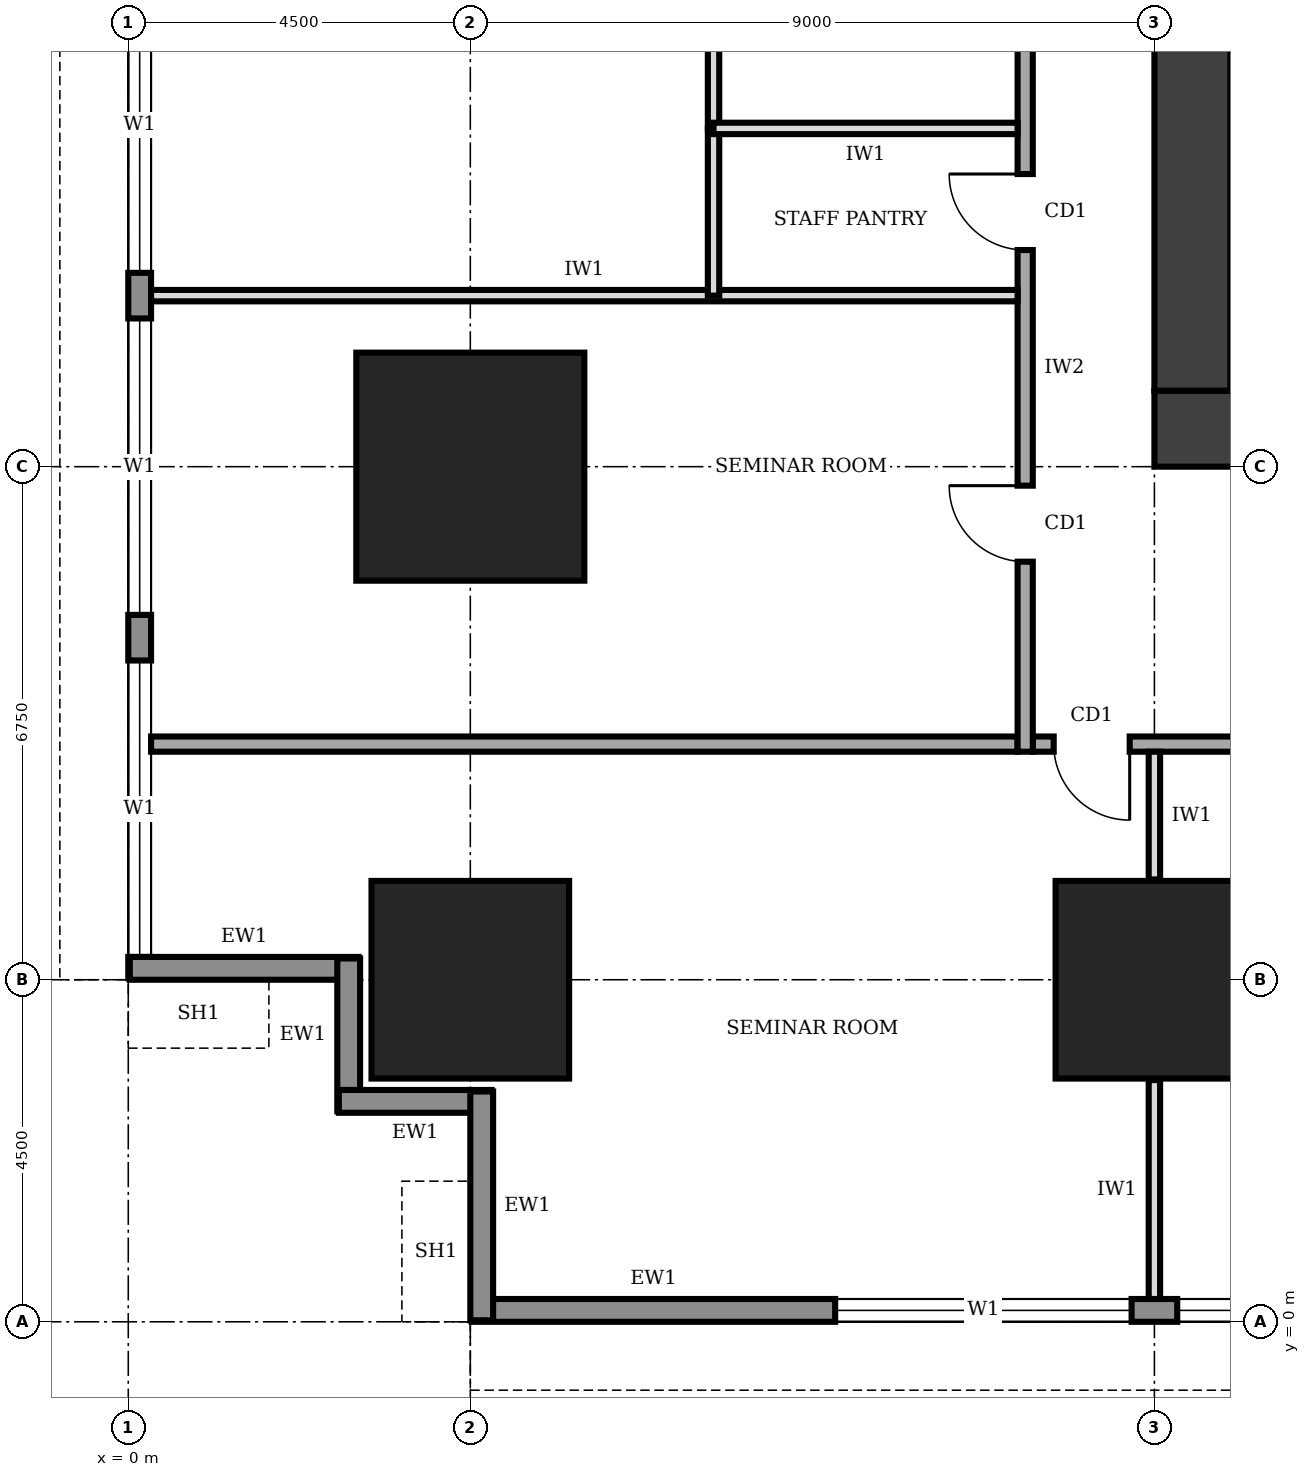
"""IFC4 building model, lengths in metres.
Left out: names, types, materials, properties, quantities, classifications, styles, units other than length and angle.
Written with IfcOpenShell. Run it as: python <this file> out.ifc"""

import sys

from ifc_helpers import new_model, si_unit, direction, frame, frame_2d, origin, origin_2d, place, context, subcontext, project, spatial, rectangle, extrude, element, fill, save


model = new_model("IFC4")
c1 = context("Model", 3, precision=1e-05, world=origin(), true_north=direction((0.0, 1.0)))
c2 = subcontext(c1, "Body", "Model", "MODEL_VIEW")
j1 = project(units=[si_unit("LENGTHUNIT", "METRE"), si_unit("PLANEANGLEUNIT", "RADIAN")], contexts=[c1])
p1 = place(None, origin())
s1 = spatial("IfcSite", under=j1, at=p1, CompositionType="ELEMENT")
p2 = place(p1, origin())
s2 = spatial("IfcBuilding", under=s1, at=p2, CompositionType="ELEMENT")
p3 = place(p2, frame((0.0, 0.0, 25.0)))
s3 = spatial("IfcBuildingStorey", under=s2, at=p3, CompositionType="ELEMENT", Elevation=25.0)
p4 = place(p3, frame((13.5, 11.75, 0.0), z_axis=(0.0, 0.0, 1.0), x_axis=(1.0, 0.0, 0.0)))
e1 = element("IfcWall", 1, at=p4, inside=s3, PredefinedType="SHEAR", context=c2, shape_type="SweptSolid", body=[
    extrude(rectangle(XDim=13.5, YDim=1.0, at=frame_2d((6.75, 0.0))), origin(), (0.0, 0.0, 1.0), 4.0),
])
p5 = place(p4, frame((4.75, 0.0, 0.0)))
e2 = element("IfcOpeningElement", 2, at=p5, cuts=e1, PredefinedType="OPENING", context=c2, shape_type="SweptSolid", body=[
    extrude(rectangle(XDim=1.0, YDim=2.1, at=frame_2d((0.5, 1.05))), frame((0.0, 0.51, 0.0), z_axis=(0.0, -1.0, 0.0), x_axis=(1.0, 0.0, 0.0)), (0.0, 0.0, 1.0), 1.02),
])
p6 = place(p3, frame((14.0, 28.25, 0.0), z_axis=(0.0, 0.0, 1.0), x_axis=(0.0, -1.0, 0.0)))
e3 = element("IfcWall", 3, at=p6, inside=s3, PredefinedType="SHEAR", context=c2, shape_type="SweptSolid", body=[
    extrude(rectangle(XDim=16.0, YDim=1.0, at=frame_2d((8.0, 0.0))), origin(), (0.0, 0.0, 1.0), 4.0),
])
for number, where, z_axis, x_axis in (
    (4, (4.5, 4.5, 0.0), (0.0, 0.0, 1.0), (1.0, 0.0, 0.0)),
    (5, (13.5, 4.5, 0.0), (0.0, 0.0, 1.0), (1.0, 0.0, 0.0)),
):
    element("IfcColumn", number, at=place(p3, frame(where, z_axis=z_axis, x_axis=x_axis)), inside=s3, PredefinedType="COLUMN", context=c2, shape_type="SweptSolid", body=[
        extrude(rectangle(XDim=2.6, YDim=2.6, at=origin_2d()), origin(), (0.0, 0.0, 1.0), 4.0),
    ])
p7 = place(p3, frame((4.5, 11.25, 0.0), z_axis=(0.0, 0.0, 1.0), x_axis=(1.0, 0.0, 0.0)))
e6 = element("IfcColumn", 6, at=p7, inside=s3, PredefinedType="COLUMN", context=c2, shape_type="SweptSolid", body=[
    extrude(rectangle(XDim=3.0, YDim=3.0, at=origin_2d()), origin(), (0.0, 0.0, 1.0), 4.0),
])
p8 = place(p3, frame((4.52, 0.15, 0.0), z_axis=(0.0, 0.0, 1.0), x_axis=(1.0, 0.0, 0.0)))
e7 = element("IfcWall", 7, at=p8, inside=s3, PredefinedType="STANDARD", context=c2, shape_type="SweptSolid", body=[
    extrude(rectangle(XDim=31.46, YDim=0.3, at=frame_2d((15.73, 0.0))), origin(), (0.0, 0.0, 1.0), 3.75),
])
p9 = place(p8, frame((4.78, 0.0, 0.9)))
e8 = element("IfcOpeningElement", 8, at=p9, cuts=e7, PredefinedType="OPENING", context=c2, shape_type="SweptSolid", body=[
    extrude(rectangle(XDim=3.9, YDim=2.2, at=frame_2d((1.95, 1.1))), frame((0.0, 0.16, 0.0), z_axis=(0.0, -1.0, 0.0), x_axis=(1.0, 0.0, 0.0)), (0.0, 0.0, 1.0), 0.32),
])
p10 = place(p8, frame((9.28, 0.0, 0.9)))
e9 = element("IfcOpeningElement", 9, at=p10, cuts=e7, PredefinedType="OPENING", context=c2, shape_type="SweptSolid", body=[
    extrude(rectangle(XDim=3.9, YDim=2.2, at=frame_2d((1.95, 1.1))), frame((0.0, 0.16, 0.0), z_axis=(0.0, -1.0, 0.0), x_axis=(1.0, 0.0, 0.0)), (0.0, 0.0, 1.0), 0.32),
])
p11 = place(p8, frame((13.78, 0.0, 0.9)))
e10 = element("IfcOpeningElement", 10, at=p11, cuts=e7, PredefinedType="OPENING", context=c2, shape_type="SweptSolid", body=[
    extrude(rectangle(XDim=3.9, YDim=2.2, at=frame_2d((1.95, 1.1))), frame((0.0, 0.16, 0.0), z_axis=(0.0, -1.0, 0.0), x_axis=(1.0, 0.0, 0.0)), (0.0, 0.0, 1.0), 0.32),
])
p12 = place(p8, frame((18.28, 0.0, 0.9)))
e11 = element("IfcOpeningElement", 11, at=p12, cuts=e7, PredefinedType="OPENING", context=c2, shape_type="SweptSolid", body=[
    extrude(rectangle(XDim=3.9, YDim=2.2, at=frame_2d((1.95, 1.1))), frame((0.0, 0.16, 0.0), z_axis=(0.0, -1.0, 0.0), x_axis=(1.0, 0.0, 0.0)), (0.0, 0.0, 1.0), 0.32),
])
p13 = place(p8, frame((22.78, 0.0, 0.9)))
e12 = element("IfcOpeningElement", 12, at=p13, cuts=e7, PredefinedType="OPENING", context=c2, shape_type="SweptSolid", body=[
    extrude(rectangle(XDim=3.9, YDim=2.2, at=frame_2d((1.95, 1.1))), frame((0.0, 0.16, 0.0), z_axis=(0.0, -1.0, 0.0), x_axis=(1.0, 0.0, 0.0)), (0.0, 0.0, 1.0), 0.32),
])
p14 = place(p8, frame((27.28, 0.0, 0.9)))
e13 = element("IfcOpeningElement", 13, at=p14, cuts=e7, PredefinedType="OPENING", context=c2, shape_type="SweptSolid", body=[
    extrude(rectangle(XDim=3.9, YDim=2.2, at=frame_2d((1.95, 1.1))), frame((0.0, 0.16, 0.0), z_axis=(0.0, -1.0, 0.0), x_axis=(1.0, 0.0, 0.0)), (0.0, 0.0, 1.0), 0.32),
])
p15 = place(p3, frame((0.15, 35.98, 0.0), z_axis=(0.0, 0.0, 1.0), x_axis=(0.0, -1.0, 0.0)))
e14 = element("IfcWall", 14, at=p15, inside=s3, PredefinedType="STANDARD", context=c2, shape_type="SweptSolid", body=[
    extrude(rectangle(XDim=31.46, YDim=0.3, at=frame_2d((15.73, 0.0))), origin(), (0.0, 0.0, 1.0), 3.75),
])
p16 = place(p15, frame((27.28, 0.0, 0.9)))
e15 = element("IfcOpeningElement", 15, at=p16, cuts=e14, PredefinedType="OPENING", context=c2, shape_type="SweptSolid", body=[
    extrude(rectangle(XDim=3.9, YDim=2.2, at=frame_2d((1.95, 1.1))), frame((0.0, 0.16, 0.0), z_axis=(0.0, -1.0, 0.0), x_axis=(1.0, 0.0, 0.0)), (0.0, 0.0, 1.0), 0.32),
])
p17 = place(p15, frame((22.78, 0.0, 0.9)))
e16 = element("IfcOpeningElement", 16, at=p17, cuts=e14, PredefinedType="OPENING", context=c2, shape_type="SweptSolid", body=[
    extrude(rectangle(XDim=3.9, YDim=2.2, at=frame_2d((1.95, 1.1))), frame((0.0, 0.16, 0.0), z_axis=(0.0, -1.0, 0.0), x_axis=(1.0, 0.0, 0.0)), (0.0, 0.0, 1.0), 0.32),
])
p18 = place(p15, frame((18.28, 0.0, 0.9)))
e17 = element("IfcOpeningElement", 17, at=p18, cuts=e14, PredefinedType="OPENING", context=c2, shape_type="SweptSolid", body=[
    extrude(rectangle(XDim=3.9, YDim=2.2, at=frame_2d((1.95, 1.1))), frame((0.0, 0.16, 0.0), z_axis=(0.0, -1.0, 0.0), x_axis=(1.0, 0.0, 0.0)), (0.0, 0.0, 1.0), 0.32),
])
p19 = place(p15, frame((13.78, 0.0, 0.9)))
e18 = element("IfcOpeningElement", 18, at=p19, cuts=e14, PredefinedType="OPENING", context=c2, shape_type="SweptSolid", body=[
    extrude(rectangle(XDim=3.9, YDim=2.2, at=frame_2d((1.95, 1.1))), frame((0.0, 0.16, 0.0), z_axis=(0.0, -1.0, 0.0), x_axis=(1.0, 0.0, 0.0)), (0.0, 0.0, 1.0), 0.32),
])
p20 = place(p15, frame((9.28, 0.0, 0.9)))
e19 = element("IfcOpeningElement", 19, at=p20, cuts=e14, PredefinedType="OPENING", context=c2, shape_type="SweptSolid", body=[
    extrude(rectangle(XDim=3.9, YDim=2.2, at=frame_2d((1.95, 1.1))), frame((0.0, 0.16, 0.0), z_axis=(0.0, -1.0, 0.0), x_axis=(1.0, 0.0, 0.0)), (0.0, 0.0, 1.0), 0.32),
])
p21 = place(p15, frame((4.78, 0.0, 0.9)))
e20 = element("IfcOpeningElement", 20, at=p21, cuts=e14, PredefinedType="OPENING", context=c2, shape_type="SweptSolid", body=[
    extrude(rectangle(XDim=3.9, YDim=2.2, at=frame_2d((1.95, 1.1))), frame((0.0, 0.16, 0.0), z_axis=(0.0, -1.0, 0.0), x_axis=(1.0, 0.0, 0.0)), (0.0, 0.0, 1.0), 0.32),
])
p22 = place(p3, frame((0.02, 4.65, 0.0), z_axis=(0.0, 0.0, 1.0), x_axis=(1.0, 0.0, 0.0)))
e21 = element("IfcWall", 21, at=p22, inside=s3, PredefinedType="STANDARD", context=c2, shape_type="SweptSolid", body=[
    extrude(rectangle(XDim=3.01, YDim=0.3, at=frame_2d((1.505, 0.0))), origin(), (0.0, 0.0, 1.0), 2.85),
])
for number, where, z_axis, x_axis in (
    (22, (2.9, 4.78, 0.0), (0.0, 0.0, 1.0), (0.0, -1.0, 0.0)),
    (23, (2.77, 2.9, 0.0), (0.0, 0.0, 1.0), (1.0, 0.0, 0.0)),
):
    element("IfcWall", number, at=place(p3, frame(where, z_axis=z_axis, x_axis=x_axis)), inside=s3, PredefinedType="STANDARD", context=c2, shape_type="SweptSolid", body=[
        extrude(rectangle(XDim=2.01, YDim=0.3, at=frame_2d((1.005, 0.0))), origin(), (0.0, 0.0, 1.0), 3.75),
    ])
p23 = place(p3, frame((4.65, 3.03, 0.0), z_axis=(0.0, 0.0, 1.0), x_axis=(0.0, -1.0, 0.0)))
e24 = element("IfcWall", 24, at=p23, inside=s3, PredefinedType="STANDARD", context=c2, shape_type="SweptSolid", body=[
    extrude(rectangle(XDim=3.01, YDim=0.3, at=frame_2d((1.505, 0.0))), origin(), (0.0, 0.0, 1.0), 2.85),
])
p24 = place(p3, frame((11.9, 7.6, 0.0), z_axis=(0.0, 0.0, 1.0), x_axis=(1.0, 0.0, 0.0)))
e25 = element("IfcWall", 25, at=p24, inside=s3, PredefinedType="SOLIDWALL", context=c2, shape_type="SweptSolid", body=[
    extrude(rectangle(XDim=16.9, YDim=0.2, at=frame_2d((8.45, 0.0))), origin(), (0.0, 0.0, 1.0), 3.75),
])
p25 = place(p24, frame((0.275, 0.0, 0.0)))
e26 = element("IfcOpeningElement", 26, at=p25, cuts=e25, PredefinedType="OPENING", context=c2, shape_type="SweptSolid", body=[
    extrude(rectangle(XDim=1.0, YDim=2.1, at=frame_2d((0.5, 1.05))), frame((0.0, 0.11, 0.0), z_axis=(0.0, -1.0, 0.0), x_axis=(1.0, 0.0, 0.0)), (0.0, 0.0, 1.0), 0.22),
])
p26 = place(p24, frame((5.6, 0.0, 0.0)))
e27 = element("IfcOpeningElement", 27, at=p26, cuts=e25, PredefinedType="OPENING", context=c2, shape_type="SweptSolid", body=[
    extrude(rectangle(XDim=1.0, YDim=2.1, at=frame_2d((0.5, 1.05))), frame((0.0, 0.11, 0.0), z_axis=(0.0, -1.0, 0.0), x_axis=(1.0, 0.0, 0.0)), (0.0, 0.0, 1.0), 0.22),
])
p27 = place(p24, frame((12.35, 0.0, 0.0)))
e28 = element("IfcOpeningElement", 28, at=p27, cuts=e25, PredefinedType="OPENING", context=c2, shape_type="SweptSolid", body=[
    extrude(rectangle(XDim=1.0, YDim=2.1, at=frame_2d((0.5, 1.05))), frame((0.0, 0.11, 0.0), z_axis=(0.0, -1.0, 0.0), x_axis=(1.0, 0.0, 0.0)), (0.0, 0.0, 1.0), 0.22),
])
p28 = place(p24, frame((15.425, 0.0, 0.0)))
e29 = element("IfcOpeningElement", 29, at=p28, cuts=e25, PredefinedType="OPENING", context=c2, shape_type="SweptSolid", body=[
    extrude(rectangle(XDim=1.0, YDim=2.1, at=frame_2d((0.5, 1.05))), frame((0.0, 0.11, 0.0), z_axis=(0.0, -1.0, 0.0), x_axis=(1.0, 0.0, 0.0)), (0.0, 0.0, 1.0), 0.22),
])
p29 = place(p3, frame((11.8, 31.3, 0.0), z_axis=(0.0, 0.0, 1.0), x_axis=(0.0, -1.0, 0.0)))
e30 = element("IfcWall", 30, at=p29, inside=s3, PredefinedType="SOLIDWALL", context=c2, shape_type="SweptSolid", body=[
    extrude(rectangle(XDim=23.8, YDim=0.2, at=frame_2d((11.9, 0.0))), origin(), (0.0, 0.0, 1.0), 3.75),
])
p30 = place(p29, frame((20.3, 0.0, 0.0)))
e31 = element("IfcOpeningElement", 31, at=p30, cuts=e30, PredefinedType="OPENING", context=c2, shape_type="SweptSolid", body=[
    extrude(rectangle(XDim=1.0, YDim=2.1, at=frame_2d((0.5, 1.05))), frame((0.0, 0.11, 0.0), z_axis=(0.0, -1.0, 0.0), x_axis=(1.0, 0.0, 0.0)), (0.0, 0.0, 1.0), 0.22),
])
p31 = place(p29, frame((16.2, 0.0, 0.0)))
e32 = element("IfcOpeningElement", 32, at=p31, cuts=e30, PredefinedType="OPENING", context=c2, shape_type="SweptSolid", body=[
    extrude(rectangle(XDim=1.0, YDim=2.1, at=frame_2d((0.5, 1.05))), frame((0.0, 0.11, 0.0), z_axis=(0.0, -1.0, 0.0), x_axis=(1.0, 0.0, 0.0)), (0.0, 0.0, 1.0), 0.22),
])
p32 = place(p29, frame((13.2, 0.0, 0.0)))
e33 = element("IfcOpeningElement", 33, at=p32, cuts=e30, PredefinedType="OPENING", context=c2, shape_type="SweptSolid", body=[
    extrude(rectangle(XDim=0.9, YDim=2.1, at=frame_2d((0.45, 1.05))), frame((0.0, 0.11, 0.0), z_axis=(0.0, -1.0, 0.0), x_axis=(1.0, 0.0, 0.0)), (0.0, 0.0, 1.0), 0.22),
])
p33 = place(p29, frame((10.15, 0.0, 0.0)))
e34 = element("IfcOpeningElement", 34, at=p33, cuts=e30, PredefinedType="OPENING", context=c2, shape_type="SweptSolid", body=[
    extrude(rectangle(XDim=0.9, YDim=2.1, at=frame_2d((0.45, 1.05))), frame((0.0, 0.11, 0.0), z_axis=(0.0, -1.0, 0.0), x_axis=(1.0, 0.0, 0.0)), (0.0, 0.0, 1.0), 0.22),
])
p34 = place(p29, frame((5.45, 0.0, 0.0)))
e35 = element("IfcOpeningElement", 35, at=p34, cuts=e30, PredefinedType="OPENING", context=c2, shape_type="SweptSolid", body=[
    extrude(rectangle(XDim=0.9, YDim=2.1, at=frame_2d((0.45, 1.05))), frame((0.0, 0.11, 0.0), z_axis=(0.0, -1.0, 0.0), x_axis=(1.0, 0.0, 0.0)), (0.0, 0.0, 1.0), 0.22),
])
p35 = place(p29, frame((8.0, 0.0, 0.0)))
e36 = element("IfcOpeningElement", 36, at=p35, cuts=e30, PredefinedType="OPENING", context=c2, shape_type="SweptSolid", body=[
    extrude(rectangle(XDim=1.0, YDim=2.1, at=frame_2d((0.5, 1.05))), frame((0.0, 0.11, 0.0), z_axis=(0.0, -1.0, 0.0), x_axis=(1.0, 0.0, 0.0)), (0.0, 0.0, 1.0), 0.22),
])
p36 = place(p29, frame((1.55, 0.0, 0.0)))
e37 = element("IfcOpeningElement", 37, at=p36, cuts=e30, PredefinedType="OPENING", context=c2, shape_type="SweptSolid", body=[
    extrude(rectangle(XDim=1.0, YDim=2.1, at=frame_2d((0.5, 1.05))), frame((0.0, 0.11, 0.0), z_axis=(0.0, -1.0, 0.0), x_axis=(1.0, 0.0, 0.0)), (0.0, 0.0, 1.0), 0.22),
])
p37 = place(p3, frame((0.3, 7.6, 0.0), z_axis=(0.0, 0.0, 1.0), x_axis=(1.0, 0.0, 0.0)))
e38 = element("IfcWall", 38, at=p37, inside=s3, PredefinedType="SOLIDWALL", context=c2, shape_type="SweptSolid", body=[
    extrude(rectangle(XDim=11.4, YDim=0.2, at=frame_2d((5.7, 0.0))), origin(), (0.0, 0.0, 1.0), 3.75),
])
p38 = place(p3, frame((13.5, 0.3, 0.0), z_axis=(0.0, 0.0, 1.0), x_axis=(0.0, 1.0, 0.0)))
e39 = element("IfcWall", 39, at=p38, inside=s3, PredefinedType="PARTITIONING", context=c2, shape_type="SweptSolid", body=[
    extrude(rectangle(XDim=2.88, YDim=0.15, at=frame_2d((1.44, 0.0))), origin(), (0.0, 0.0, 1.0), 2.85),
])
p39 = place(p3, frame((13.5, 5.82, 0.0), z_axis=(0.0, 0.0, 1.0), x_axis=(0.0, 1.0, 0.0)))
e40 = element("IfcWall", 40, at=p39, inside=s3, PredefinedType="PARTITIONING", context=c2, shape_type="SweptSolid", body=[
    extrude(rectangle(XDim=1.68, YDim=0.15, at=frame_2d((0.84, 0.0))), origin(), (0.0, 0.0, 1.0), 2.85),
])
p40 = place(p3, frame((0.3, 13.5, 0.0), z_axis=(0.0, 0.0, 1.0), x_axis=(1.0, 0.0, 0.0)))
e41 = element("IfcWall", 41, at=p40, inside=s3, PredefinedType="PARTITIONING", context=c2, shape_type="SweptSolid", body=[
    extrude(rectangle(XDim=11.4, YDim=0.15, at=frame_2d((5.7, 0.0))), origin(), (0.0, 0.0, 1.0), 3.75),
])
p41 = place(p3, frame((11.7, 15.7, 0.0), z_axis=(0.0, 0.0, 1.0), x_axis=(-1.0, 0.0, 0.0)))
e42 = element("IfcWall", 42, at=p41, inside=s3, PredefinedType="PARTITIONING", context=c2, shape_type="SweptSolid", body=[
    extrude(rectangle(XDim=4.0, YDim=0.15, at=frame_2d((2.0, 0.0))), origin(), (0.0, 0.0, 1.0), 3.75),
])
p42 = place(p3, frame((7.7, 13.5, 0.0), z_axis=(0.0, 0.0, 1.0), x_axis=(0.0, 1.0, 0.0)))
e43 = element("IfcWall", 43, at=p42, inside=s3, PredefinedType="PARTITIONING", context=c2, shape_type="SweptSolid", body=[
    extrude(rectangle(XDim=2.2, YDim=0.15, at=frame_2d((1.1, 0.0))), origin(), (0.0, 0.0, 1.0), 3.75),
])
p43 = place(p3, frame((7.7, 15.7, 0.0), z_axis=(0.0, 0.0, 1.0), x_axis=(0.0, 1.0, 0.0)))
e44 = element("IfcWall", 44, at=p43, inside=s3, PredefinedType="PARTITIONING", context=c2, shape_type="SweptSolid", body=[
    extrude(rectangle(XDim=3.9, YDim=0.15, at=frame_2d((1.95, 0.0))), origin(), (0.0, 0.0, 1.0), 3.75),
])
p44 = place(p9, origin())
e45 = element("IfcWindow", 45, at=p44, inside=s3, PartitioningType="SINGLE_PANEL", PredefinedType="WINDOW", context=c2, shape_type="SweptSolid", body=[
    extrude(rectangle(XDim=3.9, YDim=2.2, at=frame_2d((1.95, 1.1))), frame((0.0, 0.03, 0.0), z_axis=(0.0, -1.0, 0.0), x_axis=(1.0, 0.0, 0.0)), (0.0, 0.0, 1.0), 0.06),
])
fill(e8, e45)
p45 = place(p10, origin())
e46 = element("IfcWindow", 46, at=p45, inside=s3, PartitioningType="SINGLE_PANEL", PredefinedType="WINDOW", context=c2, shape_type="SweptSolid", body=[
    extrude(rectangle(XDim=3.9, YDim=2.2, at=frame_2d((1.95, 1.1))), frame((0.0, 0.03, 0.0), z_axis=(0.0, -1.0, 0.0), x_axis=(1.0, 0.0, 0.0)), (0.0, 0.0, 1.0), 0.06),
])
fill(e9, e46)
p46 = place(p16, origin())
e47 = element("IfcWindow", 47, at=p46, inside=s3, PartitioningType="SINGLE_PANEL", PredefinedType="WINDOW", context=c2, shape_type="SweptSolid", body=[
    extrude(rectangle(XDim=3.9, YDim=2.2, at=frame_2d((1.95, 1.1))), frame((0.0, 0.03, 0.0), z_axis=(0.0, -1.0, 0.0), x_axis=(1.0, 0.0, 0.0)), (0.0, 0.0, 1.0), 0.06),
])
fill(e15, e47)
p47 = place(p17, origin())
e48 = element("IfcWindow", 48, at=p47, inside=s3, PartitioningType="SINGLE_PANEL", PredefinedType="WINDOW", context=c2, shape_type="SweptSolid", body=[
    extrude(rectangle(XDim=3.9, YDim=2.2, at=frame_2d((1.95, 1.1))), frame((0.0, 0.03, 0.0), z_axis=(0.0, -1.0, 0.0), x_axis=(1.0, 0.0, 0.0)), (0.0, 0.0, 1.0), 0.06),
])
fill(e16, e48)
p48 = place(p18, origin())
e49 = element("IfcWindow", 49, at=p48, inside=s3, PartitioningType="SINGLE_PANEL", PredefinedType="WINDOW", context=c2, shape_type="SweptSolid", body=[
    extrude(rectangle(XDim=3.9, YDim=2.2, at=frame_2d((1.95, 1.1))), frame((0.0, 0.03, 0.0), z_axis=(0.0, -1.0, 0.0), x_axis=(1.0, 0.0, 0.0)), (0.0, 0.0, 1.0), 0.06),
])
fill(e17, e49)
p49 = place(p25, frame((1.0, 0.0, 0.0), z_axis=(0.0, 0.0, 1.0), x_axis=(-1.0, 0.0, 0.0)))
e50 = element("IfcDoor", 50, at=p49, inside=s3, OperationType="SINGLE_SWING_LEFT", PredefinedType="DOOR", context=c2, shape_type="SweptSolid", body=[
    extrude(rectangle(XDim=1.0, YDim=2.1, at=frame_2d((0.5, 1.05))), frame((0.0, 0.025, 0.0), z_axis=(0.0, -1.0, 0.0), x_axis=(1.0, 0.0, 0.0)), (0.0, 0.0, 1.0), 0.05),
])
fill(e26, e50)
p50 = place(p30, frame((1.0, 0.0, 0.0), z_axis=(0.0, 0.0, 1.0), x_axis=(-1.0, 0.0, 0.0)))
e51 = element("IfcDoor", 51, at=p50, inside=s3, OperationType="SINGLE_SWING_RIGHT", PredefinedType="DOOR", context=c2, shape_type="SweptSolid", body=[
    extrude(rectangle(XDim=1.0, YDim=2.1, at=frame_2d((0.5, 1.05))), frame((0.0, 0.025, 0.0), z_axis=(0.0, -1.0, 0.0), x_axis=(1.0, 0.0, 0.0)), (0.0, 0.0, 1.0), 0.05),
])
fill(e31, e51)
p51 = place(p31, frame((1.0, 0.0, 0.0), z_axis=(0.0, 0.0, 1.0), x_axis=(-1.0, 0.0, 0.0)))
e52 = element("IfcDoor", 52, at=p51, inside=s3, OperationType="SINGLE_SWING_RIGHT", PredefinedType="DOOR", context=c2, shape_type="SweptSolid", body=[
    extrude(rectangle(XDim=1.0, YDim=2.1, at=frame_2d((0.5, 1.05))), frame((0.0, 0.025, 0.0), z_axis=(0.0, -1.0, 0.0), x_axis=(1.0, 0.0, 0.0)), (0.0, 0.0, 1.0), 0.05),
])
fill(e32, e52)
save(model, sys.argv[1])
